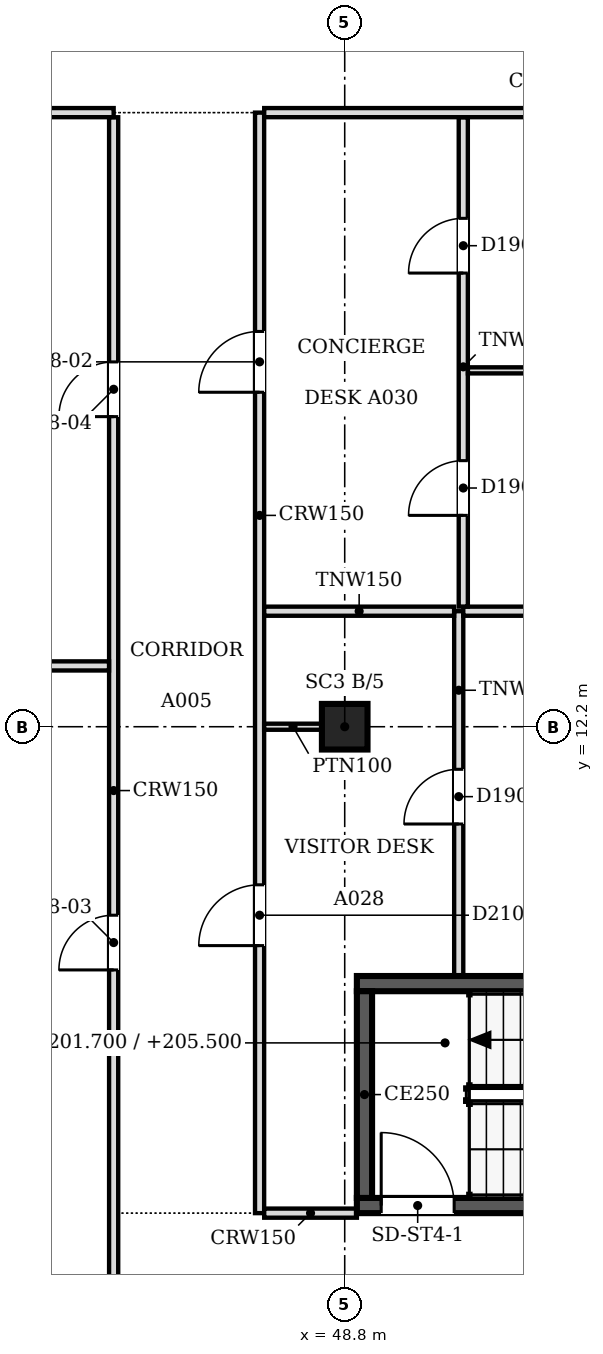
"""IFC4 building model, lengths in metres.
Left out: names, types, materials, properties, quantities, classifications, styles, units other than length and angle.
Written with IfcOpenShell. Run it as: python <this file> out.ifc"""

import sys

from ifc_helpers import new_model, si_unit, direction, frame, frame_2d, origin, origin_2d, place, context, subcontext, project, spatial, rectangle, extrude, source, transform, mapped, element, fill, save


model = new_model("IFC4")
c1 = context("Model", 3, precision=1e-05, world=origin(), true_north=direction((0.0, 1.0)))
c2 = subcontext(c1, "Body", "Model", "MODEL_VIEW")
j1 = project(units=[si_unit("LENGTHUNIT", "METRE"), si_unit("PLANEANGLEUNIT", "RADIAN")], contexts=[c1])
p1 = place(None, origin())
s1 = spatial("IfcSite", under=j1, at=p1, CompositionType="ELEMENT")
p2 = place(p1, origin())
s2 = spatial("IfcBuilding", under=s1, at=p2, CompositionType="ELEMENT")
p3 = place(p2, frame((0.0, 0.0, 197.9)))
s3 = spatial("IfcBuildingStorey", under=s2, at=p3, CompositionType="ELEMENT", Elevation=197.9)
p4 = place(p3, frame((48.8, 12.2, 0.0), z_axis=(0.0, 0.0, 1.0), x_axis=(1.0, 0.0, 0.0)))
e1 = element("IfcColumn", 1, at=p4, inside=s3, PredefinedType="COLUMN", context=c2, shape_type="SweptSolid", body=[
    extrude(rectangle(XDim=0.75, YDim=0.75, at=origin_2d()), origin(), (0.0, 0.0, 1.0), 3.6),
])
p5 = place(p3, frame((57.5, 4.325, 0.0), z_axis=(0.0, 0.0, 1.0), x_axis=(-1.0, 0.0, 0.0)))
e2 = element("IfcWall", 2, at=p5, inside=s3, PredefinedType="SOLIDWALL", context=c2, shape_type="SweptSolid", body=[
    extrude(rectangle(XDim=8.5, YDim=0.25, at=frame_2d((4.25, 0.0))), origin(), (0.0, 0.0, 1.0), 3.8),
])
m1 = source(origin(), c2, "Body", "SweptSolid", [
    extrude(rectangle(XDim=1.2, YDim=2.1, at=frame_2d((0.6, 1.05))), frame((0.0, 0.135, 0.0), z_axis=(0.0, -1.0, 0.0), x_axis=(1.0, 0.0, 0.0)), (0.0, 0.0, 1.0), 0.27),
])
p6 = place(p5, frame((6.9, 0.0, 0.0)))
e3 = element("IfcOpeningElement", 3, at=p6, cuts=e2, PredefinedType="OPENING", context=c2, shape_type="MappedRepresentation", body=[
    mapped(m1, transform((0.0, 0.0, 0.0), scale=1.0)),
])
p7 = place(p3, frame((49.125, 4.45, 0.0), z_axis=(0.0, 0.0, 1.0), x_axis=(0.0, 1.0, 0.0)))
e4 = element("IfcWall", 4, at=p7, inside=s3, PredefinedType="SOLIDWALL", context=c2, shape_type="SweptSolid", body=[
    extrude(rectangle(XDim=3.4, YDim=0.25, at=frame_2d((1.7, 0.0))), origin(), (0.0, 0.0, 1.0), 3.8),
])
p8 = place(p3, frame((49.0, 7.975, 0.0), z_axis=(0.0, 0.0, 1.0), x_axis=(1.0, 0.0, 0.0)))
e5 = element("IfcWall", 5, at=p8, inside=s3, PredefinedType="SOLIDWALL", context=c2, shape_type="SweptSolid", body=[
    extrude(rectangle(XDim=8.5, YDim=0.25, at=frame_2d((4.25, 0.0))), origin(), (0.0, 0.0, 1.0), 3.8),
])
p9 = place(p3, frame((45.0, 0.5, 0.0), z_axis=(0.0, 0.0, 1.0), x_axis=(0.0, 1.0, 0.0)))
e6 = element("IfcWall", 6, at=p9, inside=s3, PredefinedType="PARTITIONING", context=c2, shape_type="SweptSolid", body=[
    extrude(rectangle(XDim=21.724, YDim=0.15, at=frame_2d((10.862, 0.0))), origin(), (0.0, 0.0, 1.0), 3.067),
])
m2 = source(origin(), c2, "Body", "SweptSolid", [
    extrude(rectangle(XDim=0.9, YDim=2.1, at=frame_2d((0.45, 1.05))), frame((0.0, 0.085, 0.0), z_axis=(0.0, -1.0, 0.0), x_axis=(1.0, 0.0, 0.0)), (0.0, 0.0, 1.0), 0.17),
])
p10 = place(p9, frame((7.7, 0.0, 0.0)))
e7 = element("IfcOpeningElement", 7, at=p10, cuts=e6, PredefinedType="OPENING", context=c2, shape_type="MappedRepresentation", body=[
    mapped(m2, transform((0.0, 0.0, 0.0), scale=1.0)),
])
p11 = place(p9, frame((16.8, 0.0, 0.0)))
e8 = element("IfcOpeningElement", 8, at=p11, cuts=e6, PredefinedType="OPENING", context=c2, shape_type="MappedRepresentation", body=[
    mapped(m2, transform((0.0, 0.0, 0.0), scale=1.0)),
])
p12 = place(p3, frame((47.4, 22.3, 0.0), z_axis=(0.0, 0.0, 1.0), x_axis=(0.0, -1.0, 0.0)))
e9 = element("IfcWall", 9, at=p12, inside=s3, PredefinedType="PARTITIONING", context=c2, shape_type="SweptSolid", body=[
    extrude(rectangle(XDim=18.1, YDim=0.15, at=frame_2d((9.05, 0.0))), origin(), (0.0, 0.0, 1.0), 3.067),
])
m3 = source(origin(), c2, "Body", "SweptSolid", [
    extrude(rectangle(XDim=1.0, YDim=2.1, at=frame_2d((0.5, 1.05))), frame((0.0, 0.085, 0.0), z_axis=(0.0, -1.0, 0.0), x_axis=(1.0, 0.0, 0.0)), (0.0, 0.0, 1.0), 0.17),
])
p13 = place(p12, frame((3.599, 0.0, 0.0)))
e10 = element("IfcOpeningElement", 10, at=p13, cuts=e9, PredefinedType="OPENING", context=c2, shape_type="MappedRepresentation", body=[
    mapped(m3, transform((0.0, 0.0, 0.0), scale=1.0)),
])
p14 = place(p12, frame((12.7, 0.0, 0.0)))
e11 = element("IfcOpeningElement", 11, at=p14, cuts=e9, PredefinedType="OPENING", context=c2, shape_type="MappedRepresentation", body=[
    mapped(m3, transform((0.0, 0.0, 0.0), scale=1.0)),
])
p15 = place(p3, frame((47.476, 4.2, 0.0), z_axis=(0.0, 0.0, 1.0), x_axis=(1.0, 0.0, 0.0)))
e12 = element("IfcWall", 12, at=p15, inside=s3, PredefinedType="PARTITIONING", context=c2, shape_type="SweptSolid", body=[
    extrude(rectangle(XDim=1.524, YDim=0.15, at=frame_2d((0.762, 0.0))), origin(), (0.0, 0.0, 1.0), 3.067),
])
p16 = place(p3, frame((50.675, 14.1, 0.0), z_axis=(0.0, 0.0, 1.0), x_axis=(0.0, -1.0, 0.0)))
e13 = element("IfcWall", 13, at=p16, inside=s3, PredefinedType="PARTITIONING", context=c2, shape_type="SweptSolid", body=[
    extrude(rectangle(XDim=6.0, YDim=0.15, at=frame_2d((3.0, 0.0))), origin(), (0.0, 0.0, 1.0), 3.067),
])
p17 = place(p16, frame((2.6, 0.0, 0.0)))
e14 = element("IfcOpeningElement", 14, at=p17, cuts=e13, PredefinedType="OPENING", context=c2, shape_type="MappedRepresentation", body=[
    mapped(m2, transform((0.0, 0.0, 0.0), scale=1.0)),
])
p18 = place(p3, frame((48.425, 12.2, 0.0), z_axis=(0.0, 0.0, 1.0), x_axis=(-1.0, 0.0, 0.0)))
e15 = element("IfcWall", 15, at=p18, inside=s3, PredefinedType="PARTITIONING", context=c2, shape_type="SweptSolid", body=[
    extrude(rectangle(XDim=0.95, YDim=0.1, at=frame_2d((0.475, 0.0))), origin(), (0.0, 0.0, 1.0), 3.067),
])
p19 = place(p3, frame((27.575, 13.2, 0.0), z_axis=(0.0, 0.0, 1.0), x_axis=(1.0, 0.0, 0.0)))
e16 = element("IfcWall", 16, at=p19, inside=s3, PredefinedType="PARTITIONING", context=c2, shape_type="SweptSolid", body=[
    extrude(rectangle(XDim=17.349, YDim=0.15, at=frame_2d((8.675, 0.0))), origin(), (0.0, 0.0, 1.0), 3.067),
])
p20 = place(p3, frame((47.476, 14.1, 0.0), z_axis=(0.0, 0.0, 1.0), x_axis=(1.0, 0.0, 0.0)))
e17 = element("IfcWall", 17, at=p20, inside=s3, PredefinedType="PARTITIONING", context=c2, shape_type="SweptSolid", body=[
    extrude(rectangle(XDim=3.123, YDim=0.15, at=frame_2d((1.562, 0.0))), origin(), (0.0, 0.0, 1.0), 3.067),
])
p21 = place(p3, frame((50.75, 14.1, 0.0), z_axis=(0.0, 0.0, 1.0), x_axis=(1.0, 0.0, 0.0)))
e18 = element("IfcWall", 18, at=p21, inside=s3, PredefinedType="PARTITIONING", context=c2, shape_type="SweptSolid", body=[
    extrude(rectangle(XDim=9.75, YDim=0.15, at=frame_2d((4.875, 0.0))), origin(), (0.0, 0.0, 1.0), 3.067),
])
p22 = place(p3, frame((50.75, 22.224, 0.0), z_axis=(0.0, 0.0, 1.0), x_axis=(0.0, -1.0, 0.0)))
e19 = element("IfcWall", 19, at=p22, inside=s3, PredefinedType="PARTITIONING", context=c2, shape_type="SweptSolid", body=[
    extrude(rectangle(XDim=8.048, YDim=0.15, at=frame_2d((4.024, 0.0))), origin(), (0.0, 0.0, 1.0), 3.067),
])
p23 = place(p22, frame((5.648, 0.0, 0.0)))
e20 = element("IfcOpeningElement", 20, at=p23, cuts=e19, PredefinedType="OPENING", context=c2, shape_type="MappedRepresentation", body=[
    mapped(m2, transform((0.0, 0.0, 0.0), scale=1.0)),
])
p24 = place(p22, frame((1.663, 0.0, 0.0)))
e21 = element("IfcOpeningElement", 21, at=p24, cuts=e19, PredefinedType="OPENING", context=c2, shape_type="MappedRepresentation", body=[
    mapped(m2, transform((0.0, 0.0, 0.0), scale=1.0)),
])
p25 = place(p3, frame((50.826, 18.061, 0.0), z_axis=(0.0, 0.0, 1.0), x_axis=(1.0, 0.0, 0.0)))
e22 = element("IfcWall", 22, at=p25, inside=s3, PredefinedType="PARTITIONING", context=c2, shape_type="SweptSolid", body=[
    extrude(rectangle(XDim=9.674, YDim=0.1, at=frame_2d((4.837, 0.0))), origin(), (0.0, 0.0, 1.0), 3.067),
])
p26 = place(p3, frame((30.5, 22.3, 0.0), z_axis=(0.0, 0.0, 1.0), x_axis=(1.0, 0.0, 0.0)))
e23 = element("IfcWall", 23, at=p26, inside=s3, PredefinedType="PARTITIONING", context=c2, shape_type="SweptSolid", body=[
    extrude(rectangle(XDim=14.5, YDim=0.15, at=frame_2d((7.25, 0.0))), origin(), (0.0, 0.0, 1.0), 3.067),
])
p27 = place(p3, frame((47.476, 22.3, 0.0), z_axis=(0.0, 0.0, 1.0), x_axis=(1.0, 0.0, 0.0)))
e24 = element("IfcWall", 24, at=p27, inside=s3, PredefinedType="PARTITIONING", context=c2, shape_type="SweptSolid", body=[
    extrude(rectangle(XDim=9.448, YDim=0.15, at=frame_2d((4.724, 0.0))), origin(), (0.0, 0.0, 1.0), 3.067),
])
m4 = source(origin(), c2, "Body", "SweptSolid", [
    extrude(rectangle(XDim=1.2, YDim=2.1, at=frame_2d((0.6, 1.05))), frame((0.0, 0.025, 0.0), z_axis=(0.0, -1.0, 0.0), x_axis=(1.0, 0.0, 0.0)), (0.0, 0.0, 1.0), 0.05),
])
p28 = place(p6, origin())
e25 = element("IfcDoor", 25, at=p28, inside=s3, OperationType="SINGLE_SWING_RIGHT", PredefinedType="DOOR", context=c2, shape_type="MappedRepresentation", body=[
    mapped(m4, transform((0.0, 0.0, 0.0), scale=1.0)),
])
fill(e3, e25)
m5 = source(origin(), c2, "Body", "SweptSolid", [
    extrude(rectangle(XDim=0.9, YDim=2.1, at=frame_2d((0.45, 1.05))), frame((0.0, 0.025, 0.0), z_axis=(0.0, -1.0, 0.0), x_axis=(1.0, 0.0, 0.0)), (0.0, 0.0, 1.0), 0.05),
])
p29 = place(p23, origin())
e26 = element("IfcDoor", 26, at=p29, inside=s3, OperationType="SINGLE_SWING_RIGHT", PredefinedType="DOOR", context=c2, shape_type="MappedRepresentation", body=[
    mapped(m5, transform((0.0, 0.0, 0.0), scale=1.0)),
])
fill(e20, e26)
p30 = place(p24, origin())
e27 = element("IfcDoor", 27, at=p30, inside=s3, OperationType="SINGLE_SWING_RIGHT", PredefinedType="DOOR", context=c2, shape_type="MappedRepresentation", body=[
    mapped(m5, transform((0.0, 0.0, 0.0), scale=1.0)),
])
fill(e21, e27)
p31 = place(p17, origin())
e28 = element("IfcDoor", 28, at=p31, inside=s3, OperationType="SINGLE_SWING_RIGHT", PredefinedType="DOOR", context=c2, shape_type="MappedRepresentation", body=[
    mapped(m5, transform((0.0, 0.0, 0.0), scale=1.0)),
])
fill(e14, e28)
m6 = source(origin(), c2, "Body", "SweptSolid", [
    extrude(rectangle(XDim=1.0, YDim=2.1, at=frame_2d((0.5, 1.05))), frame((0.0, 0.025, 0.0), z_axis=(0.0, -1.0, 0.0), x_axis=(1.0, 0.0, 0.0)), (0.0, 0.0, 1.0), 0.05),
])
p32 = place(p13, origin())
e29 = element("IfcDoor", 29, at=p32, inside=s3, OperationType="SINGLE_SWING_RIGHT", PredefinedType="DOOR", context=c2, shape_type="MappedRepresentation", body=[
    mapped(m6, transform((0.0, 0.0, 0.0), scale=1.0)),
])
fill(e10, e29)
p33 = place(p10, origin())
e30 = element("IfcDoor", 30, at=p33, inside=s3, OperationType="SINGLE_SWING_LEFT", PredefinedType="DOOR", context=c2, shape_type="MappedRepresentation", body=[
    mapped(m5, transform((0.0, 0.0, 0.0), scale=1.0)),
])
fill(e7, e30)
p34 = place(p11, origin())
e31 = element("IfcDoor", 31, at=p34, inside=s3, OperationType="SINGLE_SWING_LEFT", PredefinedType="DOOR", context=c2, shape_type="MappedRepresentation", body=[
    mapped(m5, transform((0.0, 0.0, 0.0), scale=1.0)),
])
fill(e8, e31)
p35 = place(p14, origin())
e32 = element("IfcDoor", 32, at=p35, inside=s3, OperationType="SINGLE_SWING_RIGHT", PredefinedType="DOOR", context=c2, shape_type="MappedRepresentation", body=[
    mapped(m6, transform((0.0, 0.0, 0.0), scale=1.0)),
])
fill(e11, e32)
save(model, sys.argv[1])
